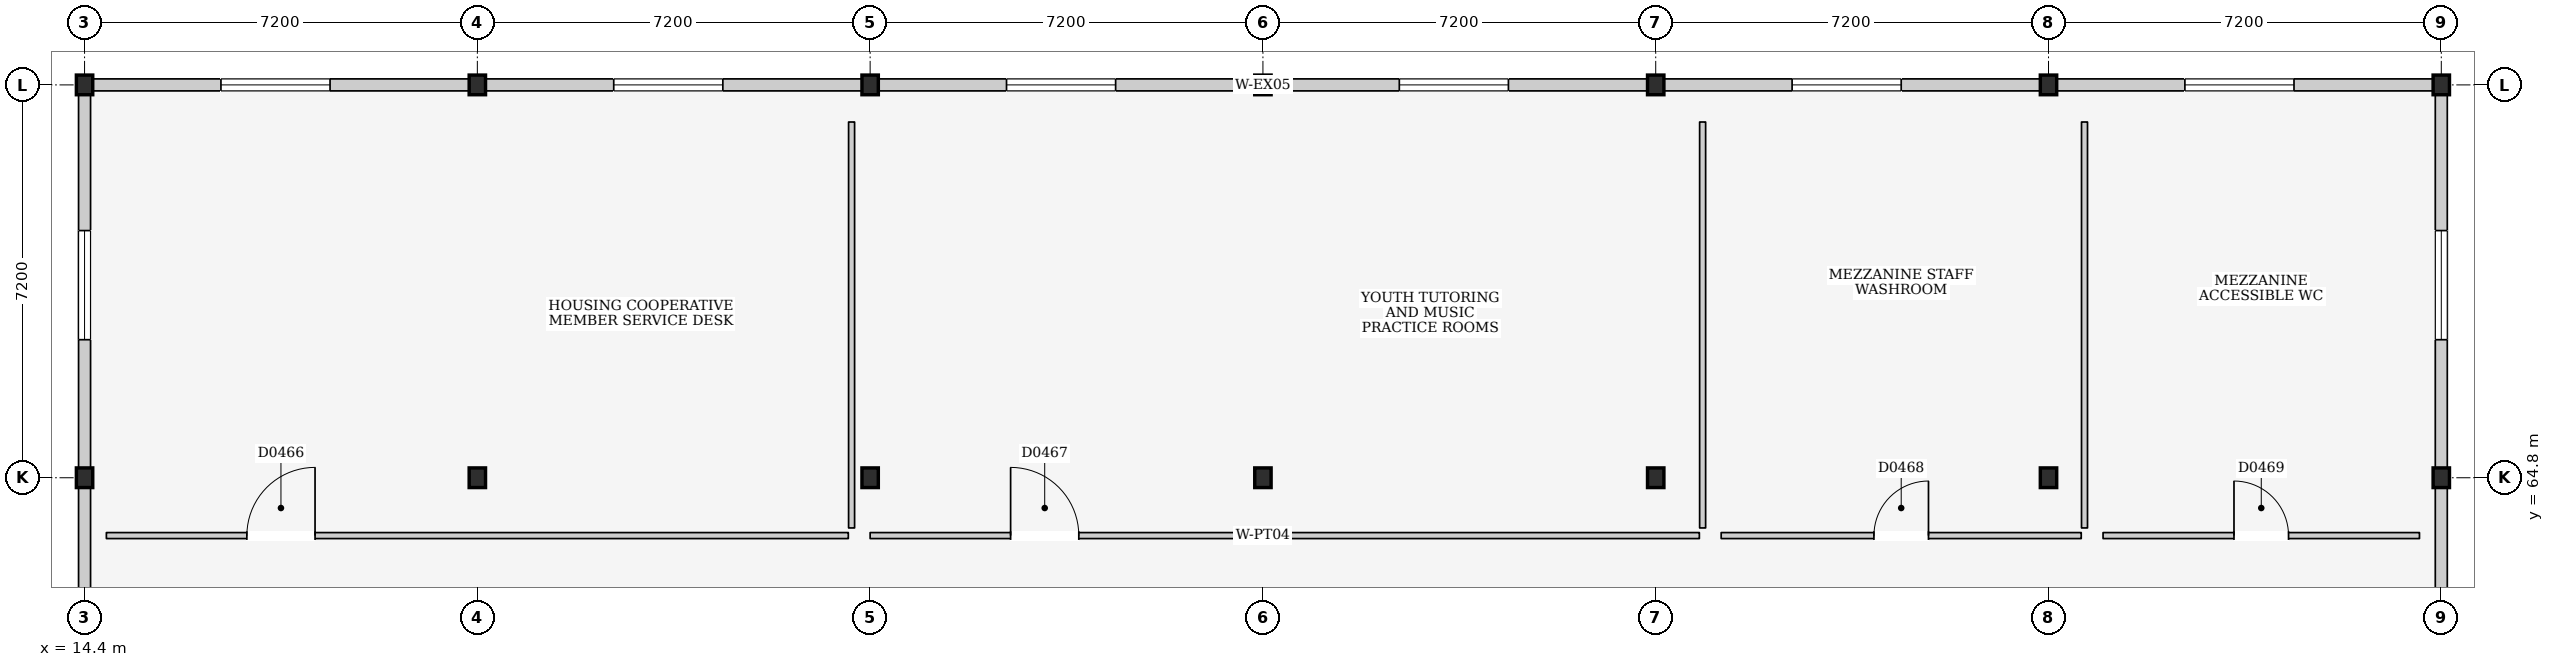
"""IFC4 building model, lengths in metres.
Left out: names, types, materials, properties, quantities, classifications, styles, units other than length and angle.
Written with IfcOpenShell. Run it as: python <this file> out.ifc"""

import sys

from ifc_helpers import new_model, si_unit, direction, frame, frame_2d, origin, origin_2d, place, context, subcontext, project, spatial, rectangle, i_section, extrude, element, fill, save


model = new_model("IFC4")
c1 = context("Model", 3, precision=1e-05, world=origin(), true_north=direction((0.0, 1.0)))
c2 = subcontext(c1, "Body", "Model", "MODEL_VIEW")
j1 = project(units=[si_unit("LENGTHUNIT", "METRE"), si_unit("PLANEANGLEUNIT", "RADIAN")], contexts=[c1])
p1 = place(None, origin())
s1 = spatial("IfcSite", under=j1, at=p1, CompositionType="ELEMENT")
p2 = place(p1, origin())
s2 = spatial("IfcBuilding", under=s1, at=p2, CompositionType="ELEMENT")
p3 = place(p2, frame((0.0, 0.0, 4.5)))
s3 = spatial("IfcBuildingStorey", under=s2, at=p3, CompositionType="ELEMENT", Elevation=4.5)
for number, where, z_axis, x_axis in (
    (1, (14.4, 64.8, 0.0), (0.0, 0.0, 1.0), (1.0, 0.0, 0.0)),
    (2, (14.4, 72.0, 0.0), (0.0, 0.0, 1.0), (1.0, 0.0, 0.0)),
    (3, (21.6, 64.8, 0.0), (0.0, 0.0, 1.0), (1.0, 0.0, 0.0)),
    (4, (21.6, 72.0, 0.0), (0.0, 0.0, 1.0), (1.0, 0.0, 0.0)),
    (5, (28.8, 64.8, 0.0), (0.0, 0.0, 1.0), (1.0, 0.0, 0.0)),
    (6, (28.8, 72.0, 0.0), (0.0, 0.0, 1.0), (1.0, 0.0, 0.0)),
    (7, (36.0, 64.8, 0.0), (0.0, 0.0, 1.0), (1.0, 0.0, 0.0)),
    (8, (36.0, 72.0, 0.0), (0.0, 0.0, 1.0), (1.0, 0.0, 0.0)),
    (9, (43.2, 64.8, 0.0), (0.0, 0.0, 1.0), (1.0, 0.0, 0.0)),
    (10, (43.2, 72.0, 0.0), (0.0, 0.0, 1.0), (1.0, 0.0, 0.0)),
    (11, (50.4, 64.8, 0.0), (0.0, 0.0, 1.0), (1.0, 0.0, 0.0)),
    (12, (50.4, 72.0, 0.0), (0.0, 0.0, 1.0), (1.0, 0.0, 0.0)),
    (13, (57.6, 64.8, 0.0), (0.0, 0.0, 1.0), (1.0, 0.0, 0.0)),
    (14, (57.6, 72.0, 0.0), (0.0, 0.0, 1.0), (1.0, 0.0, 0.0)),
):
    element("IfcColumn", number, at=place(p3, frame(where, z_axis=z_axis, x_axis=x_axis)), inside=s3, PredefinedType="COLUMN", context=c2, shape_type="SweptSolid", body=[
        extrude(i_section(OverallWidth=0.3, OverallDepth=0.36, WebThickness=0.012, FlangeThickness=0.022, at=origin_2d()), origin(), (0.0, 0.0, 1.0), 4.5),
    ])
p4 = place(p3, frame((14.55, 72.0, 0.0), z_axis=(0.0, 0.0, 1.0), x_axis=(1.0, 0.0, 0.0)))
e15 = element("IfcWall", 15, at=p4, inside=s3, PredefinedType="ELEMENTEDWALL", context=c2, shape_type="SweptSolid", body=[
    extrude(rectangle(XDim=6.9, YDim=0.22, at=frame_2d((3.45, 0.0))), origin(), (0.0, 0.0, 1.0), 3.9),
])
p5 = place(p4, frame((2.35, 0.0, 0.95)))
e16 = element("IfcOpeningElement", 16, at=p5, cuts=e15, PredefinedType="OPENING", context=c2, shape_type="SweptSolid", body=[
    extrude(rectangle(XDim=2.0, YDim=1.5, at=frame_2d((1.0, 0.75))), frame((0.0, 0.125, 0.0), z_axis=(0.0, -1.0, 0.0), x_axis=(1.0, 0.0, 0.0)), (0.0, 0.0, 1.0), 0.25),
])
p6 = place(p3, frame((21.75, 72.0, 0.0), z_axis=(0.0, 0.0, 1.0), x_axis=(1.0, 0.0, 0.0)))
e17 = element("IfcWall", 17, at=p6, inside=s3, PredefinedType="ELEMENTEDWALL", context=c2, shape_type="SweptSolid", body=[
    extrude(rectangle(XDim=6.9, YDim=0.22, at=frame_2d((3.45, 0.0))), origin(), (0.0, 0.0, 1.0), 3.9),
])
p7 = place(p6, frame((2.35, 0.0, 0.95)))
e18 = element("IfcOpeningElement", 18, at=p7, cuts=e17, PredefinedType="OPENING", context=c2, shape_type="SweptSolid", body=[
    extrude(rectangle(XDim=2.0, YDim=1.5, at=frame_2d((1.0, 0.75))), frame((0.0, 0.125, 0.0), z_axis=(0.0, -1.0, 0.0), x_axis=(1.0, 0.0, 0.0)), (0.0, 0.0, 1.0), 0.25),
])
p8 = place(p3, frame((28.95, 72.0, 0.0), z_axis=(0.0, 0.0, 1.0), x_axis=(1.0, 0.0, 0.0)))
e19 = element("IfcWall", 19, at=p8, inside=s3, PredefinedType="ELEMENTEDWALL", context=c2, shape_type="SweptSolid", body=[
    extrude(rectangle(XDim=6.9, YDim=0.22, at=frame_2d((3.45, 0.0))), origin(), (0.0, 0.0, 1.0), 3.9),
])
p9 = place(p8, frame((2.35, 0.0, 0.95)))
e20 = element("IfcOpeningElement", 20, at=p9, cuts=e19, PredefinedType="OPENING", context=c2, shape_type="SweptSolid", body=[
    extrude(rectangle(XDim=2.0, YDim=1.5, at=frame_2d((1.0, 0.75))), frame((0.0, 0.125, 0.0), z_axis=(0.0, -1.0, 0.0), x_axis=(1.0, 0.0, 0.0)), (0.0, 0.0, 1.0), 0.25),
])
p10 = place(p3, frame((36.15, 72.0, 0.0), z_axis=(0.0, 0.0, 1.0), x_axis=(1.0, 0.0, 0.0)))
e21 = element("IfcWall", 21, at=p10, inside=s3, PredefinedType="ELEMENTEDWALL", context=c2, shape_type="SweptSolid", body=[
    extrude(rectangle(XDim=6.9, YDim=0.22, at=frame_2d((3.45, 0.0))), origin(), (0.0, 0.0, 1.0), 3.9),
])
p11 = place(p10, frame((2.35, 0.0, 0.95)))
e22 = element("IfcOpeningElement", 22, at=p11, cuts=e21, PredefinedType="OPENING", context=c2, shape_type="SweptSolid", body=[
    extrude(rectangle(XDim=2.0, YDim=1.5, at=frame_2d((1.0, 0.75))), frame((0.0, 0.125, 0.0), z_axis=(0.0, -1.0, 0.0), x_axis=(1.0, 0.0, 0.0)), (0.0, 0.0, 1.0), 0.25),
])
p12 = place(p3, frame((43.35, 72.0, 0.0), z_axis=(0.0, 0.0, 1.0), x_axis=(1.0, 0.0, 0.0)))
e23 = element("IfcWall", 23, at=p12, inside=s3, PredefinedType="ELEMENTEDWALL", context=c2, shape_type="SweptSolid", body=[
    extrude(rectangle(XDim=6.9, YDim=0.22, at=frame_2d((3.45, 0.0))), origin(), (0.0, 0.0, 1.0), 3.9),
])
p13 = place(p12, frame((2.35, 0.0, 0.95)))
e24 = element("IfcOpeningElement", 24, at=p13, cuts=e23, PredefinedType="OPENING", context=c2, shape_type="SweptSolid", body=[
    extrude(rectangle(XDim=2.0, YDim=1.5, at=frame_2d((1.0, 0.75))), frame((0.0, 0.125, 0.0), z_axis=(0.0, -1.0, 0.0), x_axis=(1.0, 0.0, 0.0)), (0.0, 0.0, 1.0), 0.25),
])
p14 = place(p3, frame((50.55, 72.0, 0.0), z_axis=(0.0, 0.0, 1.0), x_axis=(1.0, 0.0, 0.0)))
e25 = element("IfcWall", 25, at=p14, inside=s3, PredefinedType="ELEMENTEDWALL", context=c2, shape_type="SweptSolid", body=[
    extrude(rectangle(XDim=6.9, YDim=0.22, at=frame_2d((3.45, 0.0))), origin(), (0.0, 0.0, 1.0), 3.9),
])
p15 = place(p14, frame((2.35, 0.0, 0.95)))
e26 = element("IfcOpeningElement", 26, at=p15, cuts=e25, PredefinedType="OPENING", context=c2, shape_type="SweptSolid", body=[
    extrude(rectangle(XDim=2.0, YDim=1.5, at=frame_2d((1.0, 0.75))), frame((0.0, 0.125, 0.0), z_axis=(0.0, -1.0, 0.0), x_axis=(1.0, 0.0, 0.0)), (0.0, 0.0, 1.0), 0.25),
])
p16 = place(p3, frame((14.4, 57.78, 0.0), z_axis=(0.0, 0.0, 1.0), x_axis=(0.0, 1.0, 0.0)))
e27 = element("IfcWall", 27, at=p16, inside=s3, PredefinedType="ELEMENTEDWALL", context=c2, shape_type="SweptSolid", body=[
    extrude(rectangle(XDim=6.84, YDim=0.22, at=frame_2d((3.42, 0.0))), origin(), (0.0, 0.0, 1.0), 3.9),
])
p17 = place(p16, frame((2.35, 0.0, 0.95)))
e28 = element("IfcOpeningElement", 28, at=p17, cuts=e27, PredefinedType="OPENING", context=c2, shape_type="SweptSolid", body=[
    extrude(rectangle(XDim=2.0, YDim=1.5, at=frame_2d((1.0, 0.75))), frame((0.0, 0.125, 0.0), z_axis=(0.0, -1.0, 0.0), x_axis=(1.0, 0.0, 0.0)), (0.0, 0.0, 1.0), 0.25),
])
p18 = place(p3, frame((57.6, 57.78, 0.0), z_axis=(0.0, 0.0, 1.0), x_axis=(0.0, 1.0, 0.0)))
e29 = element("IfcWall", 29, at=p18, inside=s3, PredefinedType="ELEMENTEDWALL", context=c2, shape_type="SweptSolid", body=[
    extrude(rectangle(XDim=6.84, YDim=0.22, at=frame_2d((3.42, 0.0))), origin(), (0.0, 0.0, 1.0), 3.9),
])
p19 = place(p18, frame((2.35, 0.0, 0.95)))
e30 = element("IfcOpeningElement", 30, at=p19, cuts=e29, PredefinedType="OPENING", context=c2, shape_type="SweptSolid", body=[
    extrude(rectangle(XDim=2.0, YDim=1.5, at=frame_2d((1.0, 0.75))), frame((0.0, 0.125, 0.0), z_axis=(0.0, -1.0, 0.0), x_axis=(1.0, 0.0, 0.0)), (0.0, 0.0, 1.0), 0.25),
])
p20 = place(p3, frame((14.4, 64.98, 0.0), z_axis=(0.0, 0.0, 1.0), x_axis=(0.0, 1.0, 0.0)))
e31 = element("IfcWall", 31, at=p20, inside=s3, PredefinedType="ELEMENTEDWALL", context=c2, shape_type="SweptSolid", body=[
    extrude(rectangle(XDim=6.84, YDim=0.22, at=frame_2d((3.42, 0.0))), origin(), (0.0, 0.0, 1.0), 3.9),
])
p21 = place(p20, frame((2.35, 0.0, 0.95)))
e32 = element("IfcOpeningElement", 32, at=p21, cuts=e31, PredefinedType="OPENING", context=c2, shape_type="SweptSolid", body=[
    extrude(rectangle(XDim=2.0, YDim=1.5, at=frame_2d((1.0, 0.75))), frame((0.0, 0.125, 0.0), z_axis=(0.0, -1.0, 0.0), x_axis=(1.0, 0.0, 0.0)), (0.0, 0.0, 1.0), 0.25),
])
p22 = place(p3, frame((57.6, 64.98, 0.0), z_axis=(0.0, 0.0, 1.0), x_axis=(0.0, 1.0, 0.0)))
e33 = element("IfcWall", 33, at=p22, inside=s3, PredefinedType="ELEMENTEDWALL", context=c2, shape_type="SweptSolid", body=[
    extrude(rectangle(XDim=6.84, YDim=0.22, at=frame_2d((3.42, 0.0))), origin(), (0.0, 0.0, 1.0), 3.9),
])
p23 = place(p22, frame((2.35, 0.0, 0.95)))
e34 = element("IfcOpeningElement", 34, at=p23, cuts=e33, PredefinedType="OPENING", context=c2, shape_type="SweptSolid", body=[
    extrude(rectangle(XDim=2.0, YDim=1.5, at=frame_2d((1.0, 0.75))), frame((0.0, 0.125, 0.0), z_axis=(0.0, -1.0, 0.0), x_axis=(1.0, 0.0, 0.0)), (0.0, 0.0, 1.0), 0.25),
])
p24 = place(p3, frame((14.8, 63.74, 0.0), z_axis=(0.0, 0.0, 1.0), x_axis=(1.0, 0.0, 0.0)))
e35 = element("IfcWall", 35, at=p24, inside=s3, PredefinedType="PARTITIONING", context=c2, shape_type="SweptSolid", body=[
    extrude(rectangle(XDim=13.6, YDim=0.11, at=frame_2d((6.8, 0.0))), origin(), (0.0, 0.0, 1.0), 4.25),
])
p25 = place(p24, frame((2.575, 0.0, 0.0)))
e36 = element("IfcOpeningElement", 36, at=p25, cuts=e35, PredefinedType="OPENING", context=c2, shape_type="SweptSolid", body=[
    extrude(rectangle(XDim=1.25, YDim=2.25, at=frame_2d((0.625, 1.125))), frame((0.0, 0.07, 0.0), z_axis=(0.0, -1.0, 0.0), x_axis=(1.0, 0.0, 0.0)), (0.0, 0.0, 1.0), 0.14),
])
p26 = place(p3, frame((28.46, 63.88, 0.0), z_axis=(0.0, 0.0, 1.0), x_axis=(0.0, 1.0, 0.0)))
e37 = element("IfcWall", 37, at=p26, inside=s3, PredefinedType="PARTITIONING", context=c2, shape_type="SweptSolid", body=[
    extrude(rectangle(XDim=7.44, YDim=0.11, at=frame_2d((3.72, 0.0))), origin(), (0.0, 0.0, 1.0), 4.25),
])
p27 = place(p3, frame((28.8, 63.74, 0.0), z_axis=(0.0, 0.0, 1.0), x_axis=(1.0, 0.0, 0.0)))
e38 = element("IfcWall", 38, at=p27, inside=s3, PredefinedType="PARTITIONING", context=c2, shape_type="SweptSolid", body=[
    extrude(rectangle(XDim=15.2, YDim=0.11, at=frame_2d((7.6, 0.0))), origin(), (0.0, 0.0, 1.0), 4.25),
])
p28 = place(p27, frame((2.575, 0.0, 0.0)))
e39 = element("IfcOpeningElement", 39, at=p28, cuts=e38, PredefinedType="OPENING", context=c2, shape_type="SweptSolid", body=[
    extrude(rectangle(XDim=1.25, YDim=2.25, at=frame_2d((0.625, 1.125))), frame((0.0, 0.07, 0.0), z_axis=(0.0, -1.0, 0.0), x_axis=(1.0, 0.0, 0.0)), (0.0, 0.0, 1.0), 0.14),
])
p29 = place(p3, frame((44.06, 63.88, 0.0), z_axis=(0.0, 0.0, 1.0), x_axis=(0.0, 1.0, 0.0)))
e40 = element("IfcWall", 40, at=p29, inside=s3, PredefinedType="PARTITIONING", context=c2, shape_type="SweptSolid", body=[
    extrude(rectangle(XDim=7.44, YDim=0.11, at=frame_2d((3.72, 0.0))), origin(), (0.0, 0.0, 1.0), 4.25),
])
p30 = place(p3, frame((44.4, 63.74, 0.0), z_axis=(0.0, 0.0, 1.0), x_axis=(1.0, 0.0, 0.0)))
e41 = element("IfcWall", 41, at=p30, inside=s3, PredefinedType="PARTITIONING", context=c2, shape_type="SweptSolid", body=[
    extrude(rectangle(XDim=6.6, YDim=0.11, at=frame_2d((3.3, 0.0))), origin(), (0.0, 0.0, 1.0), 4.25),
])
p31 = place(p30, frame((2.8, 0.0, 0.0)))
e42 = element("IfcOpeningElement", 42, at=p31, cuts=e41, PredefinedType="OPENING", context=c2, shape_type="SweptSolid", body=[
    extrude(rectangle(XDim=1.0, YDim=2.1, at=frame_2d((0.5, 1.05))), frame((0.0, 0.07, 0.0), z_axis=(0.0, -1.0, 0.0), x_axis=(1.0, 0.0, 0.0)), (0.0, 0.0, 1.0), 0.14),
])
p32 = place(p3, frame((51.06, 63.88, 0.0), z_axis=(0.0, 0.0, 1.0), x_axis=(0.0, 1.0, 0.0)))
e43 = element("IfcWall", 43, at=p32, inside=s3, PredefinedType="PARTITIONING", context=c2, shape_type="SweptSolid", body=[
    extrude(rectangle(XDim=7.44, YDim=0.11, at=frame_2d((3.72, 0.0))), origin(), (0.0, 0.0, 1.0), 4.25),
])
p33 = place(p3, frame((51.4, 63.74, 0.0), z_axis=(0.0, 0.0, 1.0), x_axis=(1.0, 0.0, 0.0)))
e44 = element("IfcWall", 44, at=p33, inside=s3, PredefinedType="PARTITIONING", context=c2, shape_type="SweptSolid", body=[
    extrude(rectangle(XDim=5.8, YDim=0.11, at=frame_2d((2.9, 0.0))), origin(), (0.0, 0.0, 1.0), 4.25),
])
p34 = place(p33, frame((2.4, 0.0, 0.0)))
e45 = element("IfcOpeningElement", 45, at=p34, cuts=e44, PredefinedType="OPENING", context=c2, shape_type="SweptSolid", body=[
    extrude(rectangle(XDim=1.0, YDim=2.1, at=frame_2d((0.5, 1.05))), frame((0.0, 0.07, 0.0), z_axis=(0.0, -1.0, 0.0), x_axis=(1.0, 0.0, 0.0)), (0.0, 0.0, 1.0), 0.14),
])
p35 = place(p5, origin())
e46 = element("IfcWindow", 46, at=p35, inside=s3, PartitioningType="DOUBLE_PANEL_VERTICAL", PredefinedType="WINDOW", context=c2, shape_type="SweptSolid", body=[
    extrude(rectangle(XDim=2.0, YDim=1.5, at=frame_2d((1.0, 0.75))), frame((0.0, 0.03, 0.0), z_axis=(0.0, -1.0, 0.0), x_axis=(1.0, 0.0, 0.0)), (0.0, 0.0, 1.0), 0.06),
])
fill(e16, e46)
p36 = place(p7, origin())
e47 = element("IfcWindow", 47, at=p36, inside=s3, PartitioningType="DOUBLE_PANEL_VERTICAL", PredefinedType="WINDOW", context=c2, shape_type="SweptSolid", body=[
    extrude(rectangle(XDim=2.0, YDim=1.5, at=frame_2d((1.0, 0.75))), frame((0.0, 0.03, 0.0), z_axis=(0.0, -1.0, 0.0), x_axis=(1.0, 0.0, 0.0)), (0.0, 0.0, 1.0), 0.06),
])
fill(e18, e47)
p37 = place(p9, origin())
e48 = element("IfcWindow", 48, at=p37, inside=s3, PartitioningType="DOUBLE_PANEL_VERTICAL", PredefinedType="WINDOW", context=c2, shape_type="SweptSolid", body=[
    extrude(rectangle(XDim=2.0, YDim=1.5, at=frame_2d((1.0, 0.75))), frame((0.0, 0.03, 0.0), z_axis=(0.0, -1.0, 0.0), x_axis=(1.0, 0.0, 0.0)), (0.0, 0.0, 1.0), 0.06),
])
fill(e20, e48)
p38 = place(p11, origin())
e49 = element("IfcWindow", 49, at=p38, inside=s3, PartitioningType="DOUBLE_PANEL_VERTICAL", PredefinedType="WINDOW", context=c2, shape_type="SweptSolid", body=[
    extrude(rectangle(XDim=2.0, YDim=1.5, at=frame_2d((1.0, 0.75))), frame((0.0, 0.03, 0.0), z_axis=(0.0, -1.0, 0.0), x_axis=(1.0, 0.0, 0.0)), (0.0, 0.0, 1.0), 0.06),
])
fill(e22, e49)
p39 = place(p13, origin())
e50 = element("IfcWindow", 50, at=p39, inside=s3, PartitioningType="DOUBLE_PANEL_VERTICAL", PredefinedType="WINDOW", context=c2, shape_type="SweptSolid", body=[
    extrude(rectangle(XDim=2.0, YDim=1.5, at=frame_2d((1.0, 0.75))), frame((0.0, 0.03, 0.0), z_axis=(0.0, -1.0, 0.0), x_axis=(1.0, 0.0, 0.0)), (0.0, 0.0, 1.0), 0.06),
])
fill(e24, e50)
p40 = place(p15, origin())
e51 = element("IfcWindow", 51, at=p40, inside=s3, PartitioningType="DOUBLE_PANEL_VERTICAL", PredefinedType="WINDOW", context=c2, shape_type="SweptSolid", body=[
    extrude(rectangle(XDim=2.0, YDim=1.5, at=frame_2d((1.0, 0.75))), frame((0.0, 0.03, 0.0), z_axis=(0.0, -1.0, 0.0), x_axis=(1.0, 0.0, 0.0)), (0.0, 0.0, 1.0), 0.06),
])
fill(e26, e51)
p41 = place(p21, origin())
e52 = element("IfcWindow", 52, at=p41, inside=s3, PartitioningType="DOUBLE_PANEL_VERTICAL", PredefinedType="WINDOW", context=c2, shape_type="SweptSolid", body=[
    extrude(rectangle(XDim=2.0, YDim=1.5, at=frame_2d((1.0, 0.75))), frame((0.0, 0.03, 0.0), z_axis=(0.0, -1.0, 0.0), x_axis=(1.0, 0.0, 0.0)), (0.0, 0.0, 1.0), 0.06),
])
fill(e32, e52)
p42 = place(p23, origin())
e53 = element("IfcWindow", 53, at=p42, inside=s3, PartitioningType="DOUBLE_PANEL_VERTICAL", PredefinedType="WINDOW", context=c2, shape_type="SweptSolid", body=[
    extrude(rectangle(XDim=2.0, YDim=1.5, at=frame_2d((1.0, 0.75))), frame((0.0, 0.03, 0.0), z_axis=(0.0, -1.0, 0.0), x_axis=(1.0, 0.0, 0.0)), (0.0, 0.0, 1.0), 0.06),
])
fill(e34, e53)
p43 = place(p25, origin())
e54 = element("IfcDoor", 54, at=p43, inside=s3, OperationType="SINGLE_SWING_RIGHT", PredefinedType="DOOR", context=c2, shape_type="SweptSolid", body=[
    extrude(rectangle(XDim=1.25, YDim=2.25, at=frame_2d((0.625, 1.125))), frame((0.0, 0.025, 0.0), z_axis=(0.0, -1.0, 0.0), x_axis=(1.0, 0.0, 0.0)), (0.0, 0.0, 1.0), 0.05),
])
fill(e36, e54)
p44 = place(p28, origin())
e55 = element("IfcDoor", 55, at=p44, inside=s3, OperationType="SINGLE_SWING_LEFT", PredefinedType="DOOR", context=c2, shape_type="SweptSolid", body=[
    extrude(rectangle(XDim=1.25, YDim=2.25, at=frame_2d((0.625, 1.125))), frame((0.0, 0.025, 0.0), z_axis=(0.0, -1.0, 0.0), x_axis=(1.0, 0.0, 0.0)), (0.0, 0.0, 1.0), 0.05),
])
fill(e39, e55)
p45 = place(p31, origin())
e56 = element("IfcDoor", 56, at=p45, inside=s3, OperationType="SINGLE_SWING_RIGHT", PredefinedType="DOOR", context=c2, shape_type="SweptSolid", body=[
    extrude(rectangle(XDim=1.0, YDim=2.1, at=frame_2d((0.5, 1.05))), frame((0.0, 0.025, 0.0), z_axis=(0.0, -1.0, 0.0), x_axis=(1.0, 0.0, 0.0)), (0.0, 0.0, 1.0), 0.05),
])
fill(e42, e56)
p46 = place(p34, origin())
e57 = element("IfcDoor", 57, at=p46, inside=s3, OperationType="SINGLE_SWING_LEFT", PredefinedType="DOOR", context=c2, shape_type="SweptSolid", body=[
    extrude(rectangle(XDim=1.0, YDim=2.1, at=frame_2d((0.5, 1.05))), frame((0.0, 0.025, 0.0), z_axis=(0.0, -1.0, 0.0), x_axis=(1.0, 0.0, 0.0)), (0.0, 0.0, 1.0), 0.05),
])
fill(e45, e57)
save(model, sys.argv[1])
